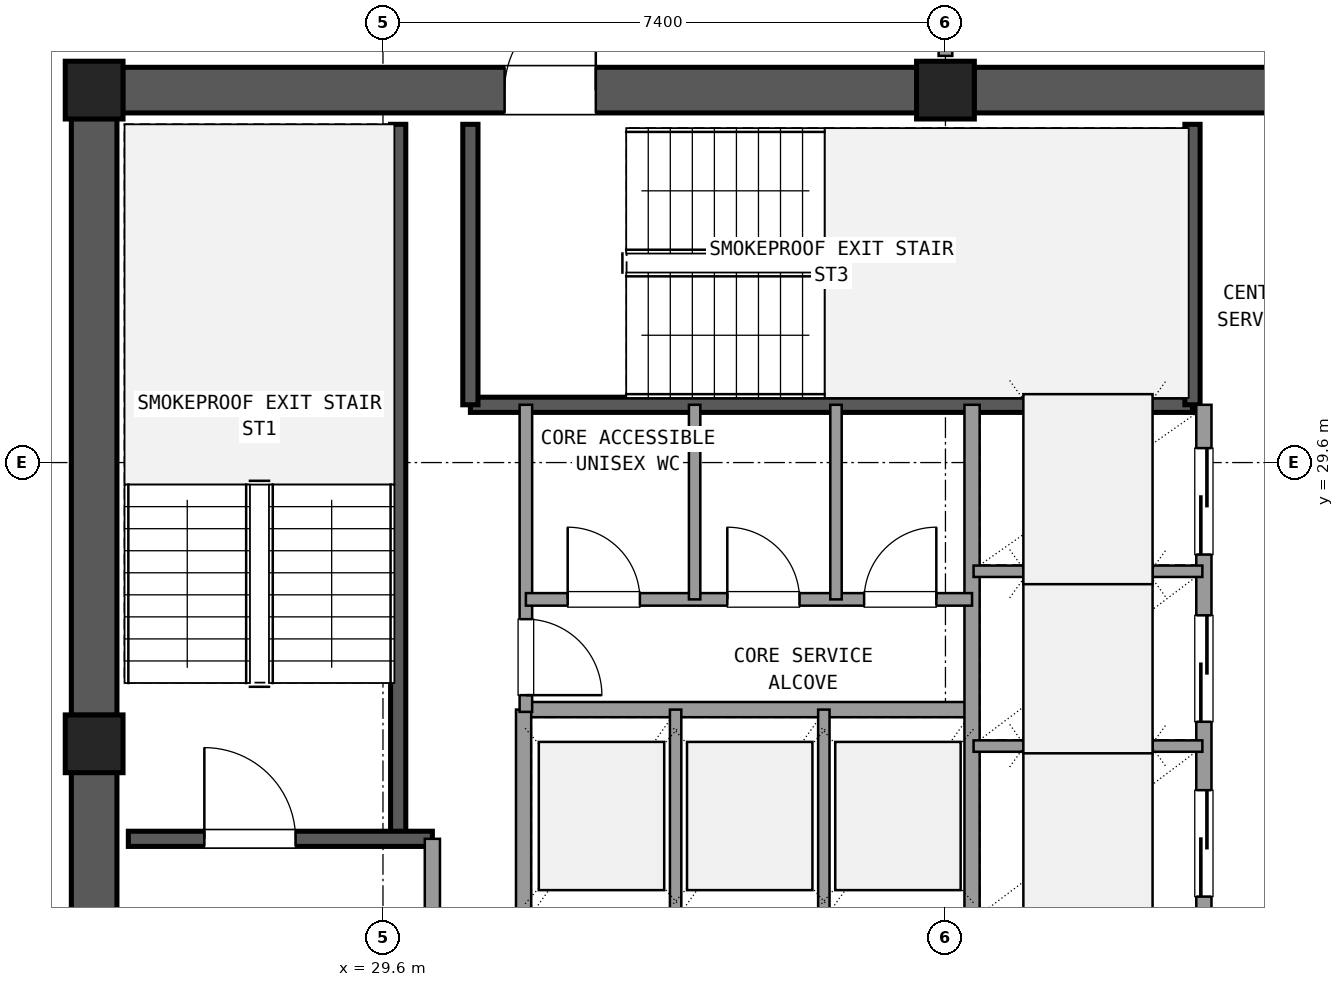
"""IFC4 building model, lengths in metres.
Left out: names, types, materials, properties, quantities, classifications, styles, units other than length and angle.
Written with IfcOpenShell. Run it as: python <this file> out.ifc"""

import sys

from ifc_helpers import new_model, si_unit, direction, frame, frame_2d, origin, origin_2d, place, context, subcontext, project, spatial, rectangle, extrude, element, fill, save


model = new_model("IFC4")
c1 = context("Model", 3, precision=1e-05, world=origin(), true_north=direction((0.0, 1.0)))
c2 = subcontext(c1, "Body", "Model", "MODEL_VIEW")
j1 = project(units=[si_unit("LENGTHUNIT", "METRE"), si_unit("PLANEANGLEUNIT", "RADIAN")], contexts=[c1])
p1 = place(None, origin())
s1 = spatial("IfcSite", under=j1, at=p1, CompositionType="ELEMENT")
p2 = place(p1, origin())
s2 = spatial("IfcBuilding", under=s1, at=p2, CompositionType="ELEMENT")
p3 = place(p2, frame((0.0, 0.0, 278.82)))
s3 = spatial("IfcBuildingStorey", under=s2, at=p3, CompositionType="ELEMENT", Elevation=278.82)
for number, where, z_axis, x_axis in (
    (1, (37.0, 34.5, 0.0), (0.0, 0.0, 1.0), (1.0, 0.0, 0.0)),
    (2, (25.8, 34.5, 0.0), (0.0, 0.0, 1.0), (1.0, 0.0, 0.0)),
    (3, (25.8, 25.9, 0.0), (0.0, 0.0, 1.0), (1.0, 0.0, 0.0)),
):
    element("IfcColumn", number, at=place(p3, frame(where, z_axis=z_axis, x_axis=x_axis)), inside=s3, PredefinedType="COLUMN", context=c2, shape_type="SweptSolid", body=[
        extrude(rectangle(XDim=0.76, YDim=0.76, at=origin_2d()), origin(), (0.0, 0.0, 1.0), 3.6),
    ])
p4 = place(p3, frame((47.825, 34.5, 0.0), z_axis=(0.0, 0.0, 1.0), x_axis=(-1.0, 0.0, 0.0)))
e4 = element("IfcWall", 4, at=p4, inside=s3, PredefinedType="SHEAR", context=c2, shape_type="SweptSolid", body=[
    extrude(rectangle(XDim=10.45, YDim=0.6, at=frame_2d((5.225, 0.0))), origin(), (0.0, 0.0, 1.0), 3.32),
])
p5 = place(p4, frame((4.725, 0.0, 0.0)))
e5 = element("IfcOpeningElement", 5, at=p5, cuts=e4, PredefinedType="OPENING", context=c2, shape_type="SweptSolid", body=[
    extrude(rectangle(XDim=1.6, YDim=2.2, at=frame_2d((0.8, 1.1))), frame((0.0, 0.31, 0.0), z_axis=(0.0, -1.0, 0.0), x_axis=(1.0, 0.0, 0.0)), (0.0, 0.0, 1.0), 0.62),
])
p6 = place(p3, frame((36.625, 34.5, 0.0), z_axis=(0.0, 0.0, 1.0), x_axis=(-1.0, 0.0, 0.0)))
e6 = element("IfcWall", 6, at=p6, inside=s3, PredefinedType="SHEAR", context=c2, shape_type="SweptSolid", body=[
    extrude(rectangle(XDim=10.45, YDim=0.6, at=frame_2d((5.225, 0.0))), origin(), (0.0, 0.0, 1.0), 3.32),
])
p7 = place(p6, frame((4.225, 0.0, 0.0)))
e7 = element("IfcOpeningElement", 7, at=p7, cuts=e6, PredefinedType="OPENING", context=c2, shape_type="SweptSolid", body=[
    extrude(rectangle(XDim=1.2, YDim=2.15, at=frame_2d((0.6, 1.075))), frame((0.0, 0.31, 0.0), z_axis=(0.0, -1.0, 0.0), x_axis=(1.0, 0.0, 0.0)), (0.0, 0.0, 1.0), 0.62),
])
p8 = place(p3, frame((25.8, 34.125, 0.0), z_axis=(0.0, 0.0, 1.0), x_axis=(0.0, -1.0, 0.0)))
e8 = element("IfcWall", 8, at=p8, inside=s3, PredefinedType="SHEAR", context=c2, shape_type="SweptSolid", body=[
    extrude(rectangle(XDim=7.85, YDim=0.6, at=frame_2d((3.925, 0.0))), origin(), (0.0, 0.0, 1.0), 3.32),
])
p9 = place(p3, frame((25.8, 25.525, 0.0), z_axis=(0.0, 0.0, 1.0), x_axis=(0.0, -1.0, 0.0)))
e9 = element("IfcWall", 9, at=p9, inside=s3, PredefinedType="SHEAR", context=c2, shape_type="SweptSolid", body=[
    extrude(rectangle(XDim=7.85, YDim=0.6, at=frame_2d((3.925, 0.0))), origin(), (0.0, 0.0, 1.0), 3.32),
])
p10 = place(p9, frame((2.275, 0.0, 0.0)))
e10 = element("IfcOpeningElement", 10, at=p10, cuts=e9, PredefinedType="OPENING", context=c2, shape_type="SweptSolid", body=[
    extrude(rectangle(XDim=1.2, YDim=2.15, at=frame_2d((0.6, 1.075))), frame((0.0, 0.31, 0.0), z_axis=(0.0, -1.0, 0.0), x_axis=(1.0, 0.0, 0.0)), (0.0, 0.0, 1.0), 0.62),
])
p11 = place(p3, frame((29.8, 24.65, 0.0), z_axis=(0.0, 0.0, 1.0), x_axis=(0.0, 1.0, 0.0)))
e11 = element("IfcWall", 11, at=p11, inside=s3, PredefinedType="SHEAR", context=c2, shape_type="SweptSolid", body=[
    extrude(rectangle(XDim=9.4, YDim=0.2, at=frame_2d((4.7, 0.0))), origin(), (0.0, 0.0, 1.0), 3.32),
])
p12 = place(p3, frame((26.25, 24.65, 0.0), z_axis=(0.0, 0.0, 1.0), x_axis=(1.0, 0.0, 0.0)))
e12 = element("IfcWall", 12, at=p12, inside=s3, PredefinedType="SHEAR", context=c2, shape_type="SweptSolid", body=[
    extrude(rectangle(XDim=4.0, YDim=0.2, at=frame_2d((2.0, 0.0))), origin(), (0.0, 0.0, 1.0), 3.32),
])
p13 = place(p12, frame((1.0, 0.0, 0.0)))
e13 = element("IfcOpeningElement", 13, at=p13, cuts=e12, PredefinedType="OPENING", context=c2, shape_type="SweptSolid", body=[
    extrude(rectangle(XDim=1.2, YDim=2.15, at=frame_2d((0.6, 1.075))), frame((0.0, 0.11, 0.0), z_axis=(0.0, -1.0, 0.0), x_axis=(1.0, 0.0, 0.0)), (0.0, 0.0, 1.0), 0.22),
])
p14 = place(p3, frame((30.75, 30.36, 0.0), z_axis=(0.0, 0.0, 1.0), x_axis=(1.0, 0.0, 0.0)))
e14 = element("IfcWall", 14, at=p14, inside=s3, PredefinedType="SHEAR", context=c2, shape_type="SweptSolid", body=[
    extrude(rectangle(XDim=9.5, YDim=0.2, at=frame_2d((4.75, 0.0))), origin(), (0.0, 0.0, 1.0), 3.32),
])
for number, where, z_axis, x_axis in (
    (15, (30.75, 30.36, 0.0), (0.0, 0.0, 1.0), (0.0, 1.0, 0.0)),
    (16, (40.25, 30.36, 0.0), (0.0, 0.0, 1.0), (0.0, 1.0, 0.0)),
):
    element("IfcWall", number, at=place(p3, frame(where, z_axis=z_axis, x_axis=x_axis)), inside=s3, PredefinedType="SHEAR", context=c2, shape_type="SweptSolid", body=[
        extrude(rectangle(XDim=3.69, YDim=0.2, at=frame_2d((1.845, 0.0))), origin(), (0.0, 0.0, 1.0), 3.32),
    ])
p15 = place(p3, frame((30.25, 17.75, 0.0), z_axis=(0.0, 0.0, 1.0), x_axis=(0.0, 1.0, 0.0)))
e17 = element("IfcWall", 17, at=p15, inside=s3, PredefinedType="SOLIDWALL", context=c2, shape_type="SweptSolid", body=[
    extrude(rectangle(XDim=6.9, YDim=0.2, at=frame_2d((3.45, 0.0))), origin(), (0.0, 0.0, 1.0), 2.61),
])
p16 = place(p15, frame((4.15, 0.0, 0.0)))
e18 = element("IfcOpeningElement", 18, at=p16, cuts=e17, PredefinedType="OPENING", context=c2, shape_type="SweptSolid", body=[
    extrude(rectangle(XDim=1.2, YDim=2.15, at=frame_2d((0.6, 1.075))), frame((0.0, 0.11, 0.0), z_axis=(0.0, -1.0, 0.0), x_axis=(1.0, 0.0, 0.0)), (0.0, 0.0, 1.0), 0.22),
])
p17 = place(p3, frame((31.45, 26.35, 0.0), z_axis=(0.0, 0.0, 1.0), x_axis=(1.0, 0.0, 0.0)))
e19 = element("IfcWall", 19, at=p17, inside=s3, PredefinedType="SOLIDWALL", context=c2, shape_type="SweptSolid", body=[
    extrude(rectangle(XDim=5.9, YDim=0.2, at=frame_2d((2.95, 0.0))), origin(), (0.0, 0.0, 1.0), 2.61),
])
p18 = place(p3, frame((31.45, 23.54, 0.0), z_axis=(0.0, 0.0, 1.0), x_axis=(0.0, 1.0, 0.0)))
e20 = element("IfcWall", 20, at=p18, inside=s3, PredefinedType="SOLIDWALL", context=c2, shape_type="SweptSolid", body=[
    extrude(rectangle(XDim=2.81, YDim=0.2, at=frame_2d((1.405, 0.0))), origin(), (0.0, 0.0, 1.0), 2.61),
])
for number, where, z_axis, x_axis in (
    (21, (33.45, 23.54, 0.0), (0.0, 0.0, 1.0), (0.0, 1.0, 0.0)),
    (22, (35.4, 23.54, 0.0), (0.0, 0.0, 1.0), (0.0, 1.0, 0.0)),
):
    element("IfcWall", number, at=place(p3, frame(where, z_axis=z_axis, x_axis=x_axis)), inside=s3, PredefinedType="PARTITIONING", context=c2, shape_type="SweptSolid", body=[
        extrude(rectangle(XDim=2.81, YDim=0.15, at=frame_2d((1.405, 0.0))), origin(), (0.0, 0.0, 1.0), 2.61),
    ])
p19 = place(p3, frame((37.35, 23.54, 0.0), z_axis=(0.0, 0.0, 1.0), x_axis=(0.0, 1.0, 0.0)))
e23 = element("IfcWall", 23, at=p19, inside=s3, PredefinedType="SOLIDWALL", context=c2, shape_type="SweptSolid", body=[
    extrude(rectangle(XDim=6.82, YDim=0.2, at=frame_2d((3.41, 0.0))), origin(), (0.0, 0.0, 1.0), 2.61),
])
p20 = place(p3, frame((40.4, 23.54, 0.0), z_axis=(0.0, 0.0, 1.0), x_axis=(0.0, 1.0, 0.0)))
e24 = element("IfcWall", 24, at=p20, inside=s3, PredefinedType="SOLIDWALL", context=c2, shape_type="SweptSolid", body=[
    extrude(rectangle(XDim=6.82, YDim=0.2, at=frame_2d((3.41, 0.0))), origin(), (0.0, 0.0, 1.0), 2.61),
])
p21 = place(p20, frame((0.35, 0.0, 0.0)))
e25 = element("IfcOpeningElement", 25, at=p21, cuts=e24, PredefinedType="OPENING", context=c2, shape_type="SweptSolid", body=[
    extrude(rectangle(XDim=1.4, YDim=2.2, at=frame_2d((0.7, 1.1))), frame((0.0, 0.11, 0.0), z_axis=(0.0, -1.0, 0.0), x_axis=(1.0, 0.0, 0.0)), (0.0, 0.0, 1.0), 0.22),
])
p22 = place(p20, frame((2.65, 0.0, 0.0)))
e26 = element("IfcOpeningElement", 26, at=p22, cuts=e24, PredefinedType="OPENING", context=c2, shape_type="SweptSolid", body=[
    extrude(rectangle(XDim=1.4, YDim=2.2, at=frame_2d((0.7, 1.1))), frame((0.0, 0.11, 0.0), z_axis=(0.0, -1.0, 0.0), x_axis=(1.0, 0.0, 0.0)), (0.0, 0.0, 1.0), 0.22),
])
p23 = place(p20, frame((4.85, 0.0, 0.0)))
e27 = element("IfcOpeningElement", 27, at=p23, cuts=e24, PredefinedType="OPENING", context=c2, shape_type="SweptSolid", body=[
    extrude(rectangle(XDim=1.4, YDim=2.2, at=frame_2d((0.7, 1.1))), frame((0.0, 0.11, 0.0), z_axis=(0.0, -1.0, 0.0), x_axis=(1.0, 0.0, 0.0)), (0.0, 0.0, 1.0), 0.22),
])
for number, where, z_axis, x_axis in (
    (28, (37.37, 25.87, 0.0), (0.0, 0.0, 1.0), (1.0, 0.0, 0.0)),
    (29, (37.37, 28.17, 0.0), (0.0, 0.0, 1.0), (1.0, 0.0, 0.0)),
):
    element("IfcWall", number, at=place(p3, frame(where, z_axis=z_axis, x_axis=x_axis)), inside=s3, PredefinedType="PARTITIONING", context=c2, shape_type="SweptSolid", body=[
        extrude(rectangle(XDim=3.01, YDim=0.15, at=frame_2d((1.505, 0.0))), origin(), (0.0, 0.0, 1.0), 2.61),
    ])
p24 = place(p3, frame((31.48, 26.32, 0.0), z_axis=(0.0, 0.0, 1.0), x_axis=(0.0, 1.0, 0.0)))
e30 = element("IfcWall", 30, at=p24, inside=s3, PredefinedType="PLUMBINGWALL", context=c2, shape_type="SweptSolid", body=[
    extrude(rectangle(XDim=4.04, YDim=0.165, at=frame_2d((2.02, 0.0))), origin(), (0.0, 0.0, 1.0), 2.61),
])
p25 = place(p24, frame((0.22, 0.0, 0.0)))
e31 = element("IfcOpeningElement", 31, at=p25, cuts=e30, PredefinedType="OPENING", context=c2, shape_type="SweptSolid", body=[
    extrude(rectangle(XDim=1.0, YDim=2.15, at=frame_2d((0.5, 1.075))), frame((0.0, 0.093, 0.0), z_axis=(0.0, -1.0, 0.0), x_axis=(1.0, 0.0, 0.0)), (0.0, 0.0, 1.0), 0.185),
])
p26 = place(p3, frame((31.48, 27.8, 0.0), z_axis=(0.0, 0.0, 1.0), x_axis=(1.0, 0.0, 0.0)))
e32 = element("IfcWall", 32, at=p26, inside=s3, PredefinedType="PLUMBINGWALL", context=c2, shape_type="SweptSolid", body=[
    extrude(rectangle(XDim=5.87, YDim=0.165, at=frame_2d((2.935, 0.0))), origin(), (0.0, 0.0, 1.0), 2.61),
])
p27 = place(p26, frame((0.55, 0.0, 0.0)))
e33 = element("IfcOpeningElement", 33, at=p27, cuts=e32, PredefinedType="OPENING", context=c2, shape_type="SweptSolid", body=[
    extrude(rectangle(XDim=0.95, YDim=2.1, at=frame_2d((0.475, 1.05))), frame((0.0, 0.093, 0.0), z_axis=(0.0, -1.0, 0.0), x_axis=(1.0, 0.0, 0.0)), (0.0, 0.0, 1.0), 0.185),
])
p28 = place(p26, frame((2.65, 0.0, 0.0)))
e34 = element("IfcOpeningElement", 34, at=p28, cuts=e32, PredefinedType="OPENING", context=c2, shape_type="SweptSolid", body=[
    extrude(rectangle(XDim=0.95, YDim=2.1, at=frame_2d((0.475, 1.05))), frame((0.0, 0.093, 0.0), z_axis=(0.0, -1.0, 0.0), x_axis=(1.0, 0.0, 0.0)), (0.0, 0.0, 1.0), 0.185),
])
p29 = place(p26, frame((4.45, 0.0, 0.0)))
e35 = element("IfcOpeningElement", 35, at=p29, cuts=e32, PredefinedType="OPENING", context=c2, shape_type="SweptSolid", body=[
    extrude(rectangle(XDim=0.95, YDim=2.1, at=frame_2d((0.475, 1.05))), frame((0.0, 0.093, 0.0), z_axis=(0.0, -1.0, 0.0), x_axis=(1.0, 0.0, 0.0)), (0.0, 0.0, 1.0), 0.185),
])
for number, where, z_axis, x_axis in (
    (36, (33.7, 27.8, 0.0), (0.0, 0.0, 1.0), (0.0, 1.0, 0.0)),
    (37, (35.56, 27.8, 0.0), (0.0, 0.0, 1.0), (0.0, 1.0, 0.0)),
):
    element("IfcWall", number, at=place(p3, frame(where, z_axis=z_axis, x_axis=x_axis)), inside=s3, PredefinedType="PARTITIONING", context=c2, shape_type="SweptSolid", body=[
        extrude(rectangle(XDim=2.56, YDim=0.15, at=frame_2d((1.28, 0.0))), origin(), (0.0, 0.0, 1.0), 2.61),
    ])
p30 = place(p3, frame((37.0, 34.95, 0.0), z_axis=(0.0, 0.0, 1.0), x_axis=(0.0, 1.0, 0.0)))
e38 = element("IfcWall", 38, at=p30, inside=s3, PredefinedType="PARTITIONING", context=c2, shape_type="SweptSolid", body=[
    extrude(rectangle(XDim=2.7, YDim=0.18, at=frame_2d((1.35, 0.0))), origin(), (0.0, 0.0, 1.0), 2.61),
])
p31 = place(p30, frame((0.35, 0.0, 0.0)))
e39 = element("IfcOpeningElement", 39, at=p31, cuts=e38, PredefinedType="OPENING", context=c2, shape_type="SweptSolid", body=[
    extrude(rectangle(XDim=2.0, YDim=2.2, at=frame_2d((1.0, 1.1))), frame((0.0, 0.1, 0.0), z_axis=(0.0, -1.0, 0.0), x_axis=(1.0, 0.0, 0.0)), (0.0, 0.0, 1.0), 0.2),
])
p32 = place(p13, origin())
e40 = element("IfcDoor", 40, at=p32, inside=s3, OperationType="SINGLE_SWING_LEFT", PredefinedType="DOOR", context=c2, shape_type="SweptSolid", body=[
    extrude(rectangle(XDim=1.2, YDim=2.15, at=frame_2d((0.6, 1.075))), frame((0.0, 0.025, 0.0), z_axis=(0.0, -1.0, 0.0), x_axis=(1.0, 0.0, 0.0)), (0.0, 0.0, 1.0), 0.05),
])
fill(e13, e40)
p33 = place(p7, frame((1.2, 0.0, 0.0), z_axis=(0.0, 0.0, 1.0), x_axis=(-1.0, 0.0, 0.0)))
e41 = element("IfcDoor", 41, at=p33, inside=s3, OperationType="SINGLE_SWING_LEFT", PredefinedType="DOOR", context=c2, shape_type="SweptSolid", body=[
    extrude(rectangle(XDim=1.2, YDim=2.15, at=frame_2d((0.6, 1.075))), frame((0.0, 0.025, 0.0), z_axis=(0.0, -1.0, 0.0), x_axis=(1.0, 0.0, 0.0)), (0.0, 0.0, 1.0), 0.05),
])
fill(e7, e41)
p34 = place(p21, origin())
e42 = element("IfcDoor", 42, at=p34, inside=s3, OperationType="SLIDING_TO_LEFT", PredefinedType="DOOR", context=c2, shape_type="SweptSolid", body=[
    extrude(rectangle(XDim=1.4, YDim=2.2, at=frame_2d((0.7, 1.1))), frame((0.0, 0.025, 0.0), z_axis=(0.0, -1.0, 0.0), x_axis=(1.0, 0.0, 0.0)), (0.0, 0.0, 1.0), 0.05),
])
fill(e25, e42)
p35 = place(p22, origin())
e43 = element("IfcDoor", 43, at=p35, inside=s3, OperationType="SLIDING_TO_LEFT", PredefinedType="DOOR", context=c2, shape_type="SweptSolid", body=[
    extrude(rectangle(XDim=1.4, YDim=2.2, at=frame_2d((0.7, 1.1))), frame((0.0, 0.025, 0.0), z_axis=(0.0, -1.0, 0.0), x_axis=(1.0, 0.0, 0.0)), (0.0, 0.0, 1.0), 0.05),
])
fill(e26, e43)
p36 = place(p23, origin())
e44 = element("IfcDoor", 44, at=p36, inside=s3, OperationType="SLIDING_TO_RIGHT", PredefinedType="DOOR", context=c2, shape_type="SweptSolid", body=[
    extrude(rectangle(XDim=1.4, YDim=2.2, at=frame_2d((0.7, 1.1))), frame((0.0, 0.025, 0.0), z_axis=(0.0, -1.0, 0.0), x_axis=(1.0, 0.0, 0.0)), (0.0, 0.0, 1.0), 0.05),
])
fill(e27, e44)
p37 = place(p25, frame((1.0, 0.0, 0.0), z_axis=(0.0, 0.0, 1.0), x_axis=(-1.0, 0.0, 0.0)))
e45 = element("IfcDoor", 45, at=p37, inside=s3, OperationType="SINGLE_SWING_LEFT", PredefinedType="DOOR", context=c2, shape_type="SweptSolid", body=[
    extrude(rectangle(XDim=1.0, YDim=2.15, at=frame_2d((0.5, 1.075))), frame((0.0, 0.025, 0.0), z_axis=(0.0, -1.0, 0.0), x_axis=(1.0, 0.0, 0.0)), (0.0, 0.0, 1.0), 0.05),
])
fill(e31, e45)
p38 = place(p27, origin())
e46 = element("IfcDoor", 46, at=p38, inside=s3, OperationType="SINGLE_SWING_LEFT", PredefinedType="DOOR", context=c2, shape_type="SweptSolid", body=[
    extrude(rectangle(XDim=0.95, YDim=2.1, at=frame_2d((0.475, 1.05))), frame((0.0, 0.025, 0.0), z_axis=(0.0, -1.0, 0.0), x_axis=(1.0, 0.0, 0.0)), (0.0, 0.0, 1.0), 0.05),
])
fill(e33, e46)
p39 = place(p28, origin())
e47 = element("IfcDoor", 47, at=p39, inside=s3, OperationType="SINGLE_SWING_LEFT", PredefinedType="DOOR", context=c2, shape_type="SweptSolid", body=[
    extrude(rectangle(XDim=0.95, YDim=2.1, at=frame_2d((0.475, 1.05))), frame((0.0, 0.025, 0.0), z_axis=(0.0, -1.0, 0.0), x_axis=(1.0, 0.0, 0.0)), (0.0, 0.0, 1.0), 0.05),
])
fill(e34, e47)
p40 = place(p29, origin())
e48 = element("IfcDoor", 48, at=p40, inside=s3, OperationType="SINGLE_SWING_RIGHT", PredefinedType="DOOR", context=c2, shape_type="SweptSolid", body=[
    extrude(rectangle(XDim=0.95, YDim=2.1, at=frame_2d((0.475, 1.05))), frame((0.0, 0.025, 0.0), z_axis=(0.0, -1.0, 0.0), x_axis=(1.0, 0.0, 0.0)), (0.0, 0.0, 1.0), 0.05),
])
fill(e35, e48)
save(model, sys.argv[1])
